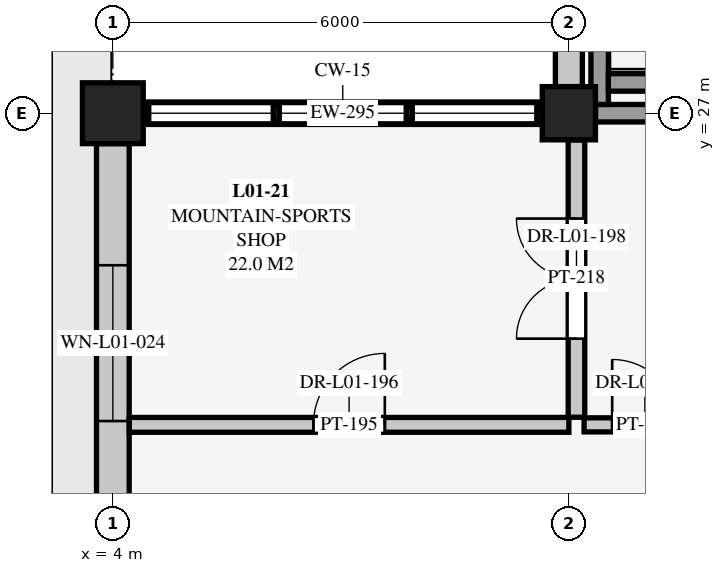
"""IFC4 building model, lengths in metres.
Left out: names, types, materials, properties, quantities, classifications, styles, units other than length and angle.
Written with IfcOpenShell. Run it as: python <this file> out.ifc"""

import sys

from ifc_helpers import new_model, si_unit, direction, frame, frame_2d, origin, origin_2d, place, context, subcontext, project, spatial, rectangle, extrude, element, fill, save


model = new_model("IFC4")
c1 = context("Model", 3, precision=1e-05, world=origin(), true_north=direction((0.0, 1.0)))
c2 = subcontext(c1, "Body", "Model", "MODEL_VIEW")
j1 = project(units=[si_unit("LENGTHUNIT", "METRE"), si_unit("PLANEANGLEUNIT", "RADIAN")], contexts=[c1])
p1 = place(None, origin())
s1 = spatial("IfcSite", under=j1, at=p1, CompositionType="ELEMENT")
p2 = place(p1, origin())
s2 = spatial("IfcBuilding", under=s1, at=p2, CompositionType="ELEMENT")
p3 = place(p2, origin())
s3 = spatial("IfcBuildingStorey", under=s2, at=p3, CompositionType="ELEMENT", Elevation=0.0)
p4 = place(p3, frame((4.0, 27.0, 0.0), z_axis=(0.0, 0.0, 1.0), x_axis=(1.0, 0.0, 0.0)))
e1 = element("IfcColumn", 1, at=p4, inside=s3, PredefinedType="COLUMN", context=c2, shape_type="SweptSolid", body=[
    extrude(rectangle(XDim=0.8, YDim=0.8, at=origin_2d()), origin(), (0.0, 0.0, 1.0), 4.5),
])
p5 = place(p3, frame((10.0, 27.0, 0.0), z_axis=(0.0, 0.0, 1.0), x_axis=(1.0, 0.0, 0.0)))
e2 = element("IfcColumn", 2, at=p5, inside=s3, PredefinedType="COLUMN", context=c2, shape_type="SweptSolid", body=[
    extrude(rectangle(XDim=0.7, YDim=0.7, at=origin_2d()), origin(), (0.0, 0.0, 1.0), 4.5),
])
p6 = place(p3, frame((4.4, 27.0, 0.0), z_axis=(0.0, 0.0, 1.0), x_axis=(1.0, 0.0, 0.0)))
e3 = element("IfcWall", 3, at=p6, inside=s3, PredefinedType="SOLIDWALL", context=c2, shape_type="SweptSolid", body=[
    extrude(rectangle(XDim=5.25, YDim=0.295, at=frame_2d((2.625, 0.0))), origin(), (0.0, 0.0, 1.0), 0.46),
])
p7 = place(p3, frame((4.0, 21.35, 0.0), z_axis=(0.0, 0.0, 1.0), x_axis=(0.0, 1.0, 0.0)))
e4 = element("IfcWall", 4, at=p7, inside=s3, PredefinedType="SOLIDWALL", context=c2, shape_type="SweptSolid", body=[
    extrude(rectangle(XDim=5.25, YDim=0.43, at=frame_2d((2.625, 0.0))), origin(), (0.0, 0.0, 1.0), 3.809),
])
p8 = place(p7, frame((1.6, 0.0, 1.2)))
e5 = element("IfcOpeningElement", 5, at=p8, cuts=e4, PredefinedType="OPENING", context=c2, shape_type="SweptSolid", body=[
    extrude(rectangle(XDim=2.05, YDim=1.55, at=frame_2d((1.025, 0.775))), frame((0.0, 0.225, 0.0), z_axis=(0.0, -1.0, 0.0), x_axis=(1.0, 0.0, 0.0)), (0.0, 0.0, 1.0), 0.45),
])
p9 = place(p3, frame((10.0, 27.35, 0.0), z_axis=(0.0, 0.0, 1.0), x_axis=(0.0, 1.0, 0.0)))
e6 = element("IfcWall", 6, at=p9, inside=s3, PredefinedType="SOLIDWALL", context=c2, shape_type="SweptSolid", body=[
    extrude(rectangle(XDim=5.325, YDim=0.355, at=frame_2d((2.663, 0.0))), origin(), (0.0, 0.0, 1.0), 3.763),
])
p10 = place(p9, frame((4.035, 0.0, 0.0)))
e7 = element("IfcOpeningElement", 7, at=p10, cuts=e6, PredefinedType="OPENING", context=c2, shape_type="SweptSolid", body=[
    extrude(rectangle(XDim=1.05, YDim=2.14, at=frame_2d((0.525, 1.07))), frame((0.0, 0.188, 0.0), z_axis=(0.0, -1.0, 0.0), x_axis=(1.0, 0.0, 0.0)), (0.0, 0.0, 1.0), 0.375),
])
p11 = place(p3, frame((10.35, 27.0, 0.0), z_axis=(0.0, 0.0, 1.0), x_axis=(1.0, 0.0, 0.0)))
e8 = element("IfcWall", 8, at=p11, inside=s3, PredefinedType="SHEAR", context=c2, shape_type="SweptSolid", body=[
    extrude(rectangle(XDim=5.3, YDim=0.23, at=frame_2d((2.65, 0.0))), origin(), (0.0, 0.0, 1.0), 4.204),
])
p12 = place(p3, frame((10.405, 27.115, 0.0), z_axis=(0.0, 0.0, 1.0), x_axis=(0.0, 1.0, 0.0)))
e9 = element("IfcWall", 9, at=p12, inside=s3, PredefinedType="SHEAR", context=c2, shape_type="SweptSolid", body=[
    extrude(rectangle(XDim=3.735, YDim=0.23, at=frame_2d((1.868, 0.0))), origin(), (0.0, 0.0, 1.0), 4.5),
])
p13 = place(p3, frame((10.52, 27.405, 0.0), z_axis=(0.0, 0.0, 1.0), x_axis=(1.0, 0.0, 0.0)))
e10 = element("IfcWall", 10, at=p13, inside=s3, PredefinedType="SHEAR", context=c2, shape_type="SweptSolid", body=[
    extrude(rectangle(XDim=5.13, YDim=0.23, at=frame_2d((2.565, 0.0))), origin(), (0.0, 0.0, 1.0), 4.5),
])
p14 = place(p3, frame((10.2, 22.9, 0.0), z_axis=(0.0, 0.0, 1.0), x_axis=(1.0, 0.0, 0.0)))
e11 = element("IfcWall", 11, at=p14, inside=s3, PredefinedType="PARTITIONING", context=c2, shape_type="SweptSolid", body=[
    extrude(rectangle(XDim=1.6, YDim=0.185, at=frame_2d((0.8, 0.0))), origin(), (0.0, 0.0, 1.0), 4.216),
])
p15 = place(p14, frame((0.37, 0.0, 0.0)))
e12 = element("IfcOpeningElement", 12, at=p15, cuts=e11, PredefinedType="OPENING", context=c2, shape_type="SweptSolid", body=[
    extrude(rectangle(XDim=0.86, YDim=2.1, at=frame_2d((0.43, 1.05))), frame((0.0, 0.103, 0.0), z_axis=(0.0, -1.0, 0.0), x_axis=(1.0, 0.0, 0.0)), (0.0, 0.0, 1.0), 0.205),
])
p16 = place(p3, frame((4.217, 22.9, 0.0), z_axis=(0.0, 0.0, 1.0), x_axis=(1.0, 0.0, 0.0)))
e13 = element("IfcWall", 13, at=p16, inside=s3, PredefinedType="PARTITIONING", context=c2, shape_type="SweptSolid", body=[
    extrude(rectangle(XDim=5.783, YDim=0.195, at=frame_2d((2.892, 0.0))), origin(), (0.0, 0.0, 1.0), 4.216),
])
p17 = place(p16, frame((2.421, 0.0, 0.0)))
e14 = element("IfcOpeningElement", 14, at=p17, cuts=e13, PredefinedType="OPENING", context=c2, shape_type="SweptSolid", body=[
    extrude(rectangle(XDim=0.94, YDim=2.1, at=frame_2d((0.47, 1.05))), frame((0.0, 0.108, 0.0), z_axis=(0.0, -1.0, 0.0), x_axis=(1.0, 0.0, 0.0)), (0.0, 0.0, 1.0), 0.215),
])
p18 = place(p3, frame((10.1, 23.0, 0.0), z_axis=(0.0, 0.0, 1.0), x_axis=(0.0, 1.0, 0.0)))
e15 = element("IfcWall", 15, at=p18, inside=s3, PredefinedType="PARTITIONING", context=c2, shape_type="SweptSolid", body=[
    extrude(rectangle(XDim=3.648, YDim=0.218, at=frame_2d((1.824, 0.0))), origin(), (0.0, 0.0, 1.0), 4.216),
])
p19 = place(p18, frame((1.034, 0.0, 0.0)))
e16 = element("IfcOpeningElement", 16, at=p19, cuts=e15, PredefinedType="OPENING", context=c2, shape_type="SweptSolid", body=[
    extrude(rectangle(XDim=1.58, YDim=2.2, at=frame_2d((0.79, 1.1))), frame((0.0, 0.119, 0.0), z_axis=(0.0, -1.0, 0.0), x_axis=(1.0, 0.0, 0.0)), (0.0, 0.0, 1.0), 0.238),
])
p20 = place(p8, origin())
e17 = element("IfcWindow", 17, at=p20, inside=s3, PartitioningType="SINGLE_PANEL", PredefinedType="WINDOW", context=c2, shape_type="SweptSolid", body=[
    extrude(rectangle(XDim=2.05, YDim=1.55, at=frame_2d((1.025, 0.775))), frame((0.0, 0.03, 0.0), z_axis=(0.0, -1.0, 0.0), x_axis=(1.0, 0.0, 0.0)), (0.0, 0.0, 1.0), 0.06),
])
fill(e5, e17)
p21 = place(p15, origin())
e18 = element("IfcDoor", 18, at=p21, inside=s3, OperationType="SINGLE_SWING_LEFT", PredefinedType="DOOR", context=c2, shape_type="SweptSolid", body=[
    extrude(rectangle(XDim=0.86, YDim=2.1, at=frame_2d((0.43, 1.05))), frame((0.0, 0.025, 0.0), z_axis=(0.0, -1.0, 0.0), x_axis=(1.0, 0.0, 0.0)), (0.0, 0.0, 1.0), 0.05),
])
fill(e12, e18)
p22 = place(p17, origin())
e19 = element("IfcDoor", 19, at=p22, inside=s3, OperationType="SINGLE_SWING_RIGHT", PredefinedType="DOOR", context=c2, shape_type="SweptSolid", body=[
    extrude(rectangle(XDim=0.94, YDim=2.1, at=frame_2d((0.47, 1.05))), frame((0.0, 0.025, 0.0), z_axis=(0.0, -1.0, 0.0), x_axis=(1.0, 0.0, 0.0)), (0.0, 0.0, 1.0), 0.05),
])
fill(e14, e19)
p23 = place(p19, origin())
e20 = element("IfcDoor", 20, at=p23, inside=s3, OperationType="DOUBLE_DOOR_SINGLE_SWING", PredefinedType="DOOR", context=c2, shape_type="SweptSolid", body=[
    extrude(rectangle(XDim=1.58, YDim=2.2, at=frame_2d((0.79, 1.1))), frame((0.0, 0.025, 0.0), z_axis=(0.0, -1.0, 0.0), x_axis=(1.0, 0.0, 0.0)), (0.0, 0.0, 1.0), 0.05),
])
fill(e16, e20)
save(model, sys.argv[1])
